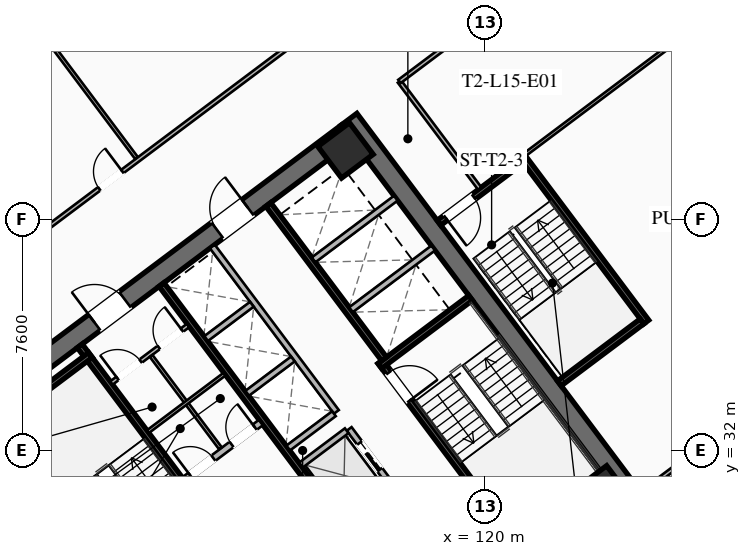
"""IFC4 building model, lengths in metres.
Left out: names, types, materials, properties, quantities, classifications, styles, units other than length and angle.
Written with IfcOpenShell. Run it as: python <this file> out.ifc"""

import sys

from ifc_helpers import new_model, si_unit, direction, frame, frame_2d, origin, origin_2d, place, context, subcontext, project, spatial, rectangle, hollow_rectangle, extrude, element, fill, save


model = new_model("IFC4")
c1 = context("Model", 3, precision=1e-05, world=origin(), true_north=direction((0.0, 1.0)))
c2 = subcontext(c1, "Body", "Model", "MODEL_VIEW")
j1 = project(units=[si_unit("LENGTHUNIT", "METRE"), si_unit("PLANEANGLEUNIT", "RADIAN")], contexts=[c1])
p1 = place(None, origin())
s1 = spatial("IfcSite", under=j1, at=p1, CompositionType="ELEMENT")
p2 = place(p1, origin())
s2 = spatial("IfcBuilding", under=s1, at=p2, CompositionType="ELEMENT")
p3 = place(p2, frame((0.0, 0.0, 60.1)))
s3 = spatial("IfcBuildingStorey", under=s2, at=p3, CompositionType="ELEMENT", Elevation=60.1)
for number, where, z_axis, x_axis in (
    (1, (112.476, 21.107, 0.0), (0.0, 0.0, 1.0), (-0.6, 0.8, 0.0)),
    (2, (115.524, 42.893, 0.0), (0.0, 0.0, 1.0), (0.6, -0.8, 0.0)),
):
    element("IfcWall", number, at=place(p3, frame(where, z_axis=z_axis, x_axis=x_axis)), inside=s3, PredefinedType="SHEAR", context=c2, shape_type="SweptSolid", body=[
        extrude(rectangle(XDim=15.6, YDim=0.65, at=frame_2d((7.8, 0.0))), origin(), (0.0, 0.0, 1.0), 3.55),
    ])
p4 = place(p3, frame((103.571, 33.522, 0.0), z_axis=(0.0, 0.0, 1.0), x_axis=(0.799998028465, 0.600002628705, 0.0)))
e3 = element("IfcWall", 3, at=p4, inside=s3, PredefinedType="SHEAR", context=c2, shape_type="SweptSolid", body=[
    extrude(rectangle(XDim=14.86, YDim=0.65, at=frame_2d((7.43, 0.0))), origin(), (0.0, 0.0, 1.0), 3.55),
])
p5 = place(p4, frame((4.48, 0.0, 0.0)))
e4 = element("IfcOpeningElement", 4, at=p5, cuts=e3, PredefinedType="OPENING", context=c2, shape_type="SweptSolid", body=[
    extrude(rectangle(XDim=1.25, YDim=2.25, at=frame_2d((0.625, 1.125))), frame((0.0, 0.335, 0.0), z_axis=(0.0, -1.0, 0.0), x_axis=(1.0, 0.0, 0.0)), (0.0, 0.0, 1.0), 0.67),
])
p6 = place(p4, frame((9.53, 0.0, 0.0)))
e5 = element("IfcOpeningElement", 5, at=p6, cuts=e3, PredefinedType="OPENING", context=c2, shape_type="SweptSolid", body=[
    extrude(rectangle(XDim=1.25, YDim=2.25, at=frame_2d((0.625, 1.125))), frame((0.0, 0.335, 0.0), z_axis=(0.0, -1.0, 0.0), x_axis=(1.0, 0.0, 0.0)), (0.0, 0.0, 1.0), 0.67),
])
for number, where, z_axis, x_axis in (
    (6, (123.87, 30.59, 0.0), (0.0, 0.0, 1.0), (0.8, 0.6, 0.0)),
    (7, (115.41, 41.87, 0.0), (0.0, 0.0, 1.0), (0.8, 0.6, 0.0)),
):
    element("IfcColumn", number, at=place(p3, frame(where, z_axis=z_axis, x_axis=x_axis)), inside=s3, PredefinedType="COLUMN", context=c2, shape_type="SweptSolid", body=[
        extrude(hollow_rectangle(XDim=1.3, YDim=1.3, WallThickness=0.05, at=origin_2d()), origin(), (0.0, 0.0, 1.0), 3.35),
    ])
p7 = place(p3, frame((111.44, 29.08, 0.0), z_axis=(0.0, 0.0, 1.0), x_axis=(-0.600009827119, 0.799992629566, 0.0)))
e8 = element("IfcWall", 8, at=p7, inside=s3, PredefinedType="SHEAR", context=c2, shape_type="SweptSolid", body=[
    extrude(rectangle(XDim=7.95, YDim=0.2, at=frame_2d((3.975, 0.0))), origin(), (0.0, 0.0, 1.0), 3.35),
])
p8 = place(p7, frame((0.45, 0.0, 0.0)))
e9 = element("IfcOpeningElement", 9, at=p8, cuts=e8, PredefinedType="OPENING", context=c2, shape_type="SweptSolid", body=[
    extrude(rectangle(XDim=1.15, YDim=2.2, at=frame_2d((0.575, 1.1))), frame((0.0, 0.11, 0.0), z_axis=(0.0, -1.0, 0.0), x_axis=(1.0, 0.0, 0.0)), (0.0, 0.0, 1.0), 0.22),
])
p9 = place(p3, frame((104.036, 32.902, 0.0), z_axis=(0.0, 0.0, 1.0), x_axis=(0.800039270442, 0.59994763584, 0.0)))
e10 = element("IfcWall", 10, at=p9, inside=s3, PredefinedType="SHEAR", context=c2, shape_type="SweptSolid", body=[
    extrude(rectangle(XDim=3.73, YDim=0.2, at=frame_2d((1.865, 0.0))), origin(), (0.0, 0.0, 1.0), 3.35),
])
p10 = place(p3, frame((116.56, 34.92, 0.0), z_axis=(0.0, 0.0, 1.0), x_axis=(0.600009827119, -0.799992629566, 0.0)))
e11 = element("IfcWall", 11, at=p10, inside=s3, PredefinedType="SHEAR", context=c2, shape_type="SweptSolid", body=[
    extrude(rectangle(XDim=7.95, YDim=0.2, at=frame_2d((3.975, 0.0))), origin(), (0.0, 0.0, 1.0), 3.35),
])
p11 = place(p10, frame((0.45, 0.0, 0.0)))
e12 = element("IfcOpeningElement", 12, at=p11, cuts=e11, PredefinedType="OPENING", context=c2, shape_type="SweptSolid", body=[
    extrude(rectangle(XDim=1.15, YDim=2.2, at=frame_2d((0.575, 1.1))), frame((0.0, 0.11, 0.0), z_axis=(0.0, -1.0, 0.0), x_axis=(1.0, 0.0, 0.0)), (0.0, 0.0, 1.0), 0.22),
])
for number, where, z_axis, x_axis in (
    (13, (116.54, 34.78, 0.0), (0.0, 0.0, 1.0), (0.8, 0.6, 0.0)),
    (14, (120.98, 28.86, 0.0), (0.0, 0.0, 1.0), (0.8, 0.6, 0.0)),
):
    element("IfcWall", number, at=place(p3, frame(where, z_axis=z_axis, x_axis=x_axis)), inside=s3, PredefinedType="SHEAR", context=c2, shape_type="SweptSolid", body=[
        extrude(rectangle(XDim=3.73, YDim=0.2, at=frame_2d((1.865, 0.0))), origin(), (0.0, 0.0, 1.0), 3.35),
    ])
p12 = place(p3, frame((117.938, 26.016, 0.0), z_axis=(0.0, 0.0, 1.0), x_axis=(-0.600005463273, 0.799995902516, 0.0)))
e15 = element("IfcWall", 15, at=p12, inside=s3, PredefinedType="SHEAR", context=c2, shape_type="SweptSolid", body=[
    extrude(rectangle(XDim=14.3, YDim=0.2, at=frame_2d((7.15, 0.0))), origin(), (0.0, 0.0, 1.0), 3.35),
])
p13 = place(p3, frame((110.104, 31.028, 0.0), z_axis=(0.0, 0.0, 1.0), x_axis=(0.800018601094, 0.59997519774, 0.0)))
e16 = element("IfcWall", 16, at=p13, inside=s3, PredefinedType="SOLIDWALL", context=c2, shape_type="SweptSolid", body=[
    extrude(rectangle(XDim=3.15, YDim=0.22, at=frame_2d((1.575, 0.0))), origin(), (0.0, 0.0, 1.0), 2.703),
])
p14 = place(p13, frame((0.25, 0.0, 0.0)))
e17 = element("IfcOpeningElement", 17, at=p14, cuts=e16, PredefinedType="OPENING", context=c2, shape_type="SweptSolid", body=[
    extrude(rectangle(XDim=0.95, YDim=2.05, at=frame_2d((0.475, 1.025))), frame((0.0, 0.12, 0.0), z_axis=(0.0, -1.0, 0.0), x_axis=(1.0, 0.0, 0.0)), (0.0, 0.0, 1.0), 0.24),
])
p15 = place(p13, frame((1.95, 0.0, 0.0)))
e18 = element("IfcOpeningElement", 18, at=p15, cuts=e16, PredefinedType="OPENING", context=c2, shape_type="SweptSolid", body=[
    extrude(rectangle(XDim=0.95, YDim=2.05, at=frame_2d((0.475, 1.025))), frame((0.0, 0.12, 0.0), z_axis=(0.0, -1.0, 0.0), x_axis=(1.0, 0.0, 0.0)), (0.0, 0.0, 1.0), 0.24),
])
p16 = place(p3, frame((112.87, 40.09, 0.0), z_axis=(0.0, 0.0, 1.0), x_axis=(0.599975393228, -0.800018454488, 0.0)))
e19 = element("IfcWall", 19, at=p16, inside=s3, PredefinedType="SHEAR", context=c2, shape_type="SweptSolid", body=[
    extrude(rectangle(XDim=6.35, YDim=0.2, at=frame_2d((3.175, 0.0))), origin(), (0.0, 0.0, 1.0), 3.35),
])
for number, where, z_axis, x_axis in (
    (20, (115.59, 36.63, 0.0), (0.0, 0.0, 1.0), (0.8, 0.6, 0.0)),
    (21, (114.36, 38.27, 0.0), (0.0, 0.0, 1.0), (0.8, 0.6, 0.0)),
):
    element("IfcWall", number, at=place(p3, frame(where, z_axis=z_axis, x_axis=x_axis)), inside=s3, PredefinedType="SOLIDWALL", context=c2, shape_type="SweptSolid", body=[
        extrude(rectangle(XDim=3.38, YDim=0.2, at=frame_2d((1.69, 0.0))), origin(), (0.0, 0.0, 1.0), 3.35),
    ])
p17 = place(p3, frame((107.71, 34.22, 0.0), z_axis=(0.0, 0.0, 1.0), x_axis=(0.799981399002, 0.60002480053, 0.0)))
e22 = element("IfcWall", 22, at=p17, inside=s3, PredefinedType="PARTITIONING", context=c2, shape_type="SweptSolid", body=[
    extrude(rectangle(XDim=3.15, YDim=0.135, at=frame_2d((1.575, 0.0))), origin(), (0.0, 0.0, 1.0), 2.703),
])
p18 = place(p17, frame((0.25, 0.0, 0.0)))
e23 = element("IfcOpeningElement", 23, at=p18, cuts=e22, PredefinedType="OPENING", context=c2, shape_type="SweptSolid", body=[
    extrude(rectangle(XDim=0.95, YDim=2.05, at=frame_2d((0.475, 1.025))), frame((0.0, 0.077, 0.0), z_axis=(0.0, -1.0, 0.0), x_axis=(1.0, 0.0, 0.0)), (0.0, 0.0, 1.0), 0.155),
])
p19 = place(p17, frame((1.95, 0.0, 0.0)))
e24 = element("IfcOpeningElement", 24, at=p19, cuts=e22, PredefinedType="OPENING", context=c2, shape_type="SweptSolid", body=[
    extrude(rectangle(XDim=0.95, YDim=2.05, at=frame_2d((0.475, 1.025))), frame((0.0, 0.077, 0.0), z_axis=(0.0, -1.0, 0.0), x_axis=(1.0, 0.0, 0.0)), (0.0, 0.0, 1.0), 0.155),
])
p20 = place(p3, frame((111.296, 32.072, 0.0), z_axis=(0.0, 0.0, 1.0), x_axis=(-0.59995887973, 0.800030838552, 0.0)))
e25 = element("IfcWall", 25, at=p20, inside=s3, PredefinedType="PARTITIONING", context=c2, shape_type="SweptSolid", body=[
    extrude(rectangle(XDim=3.8, YDim=0.11, at=frame_2d((1.9, 0.0))), origin(), (0.0, 0.0, 1.0), 2.703),
])
p21 = place(p3, frame((108.91, 32.62, 0.0), z_axis=(0.0, 0.0, 1.0), x_axis=(0.800018601094, 0.59997519774, 0.0)))
e26 = element("IfcWall", 26, at=p21, inside=s3, PredefinedType="PARTITIONING", context=c2, shape_type="SweptSolid", body=[
    extrude(rectangle(XDim=3.15, YDim=0.11, at=frame_2d((1.575, 0.0))), origin(), (0.0, 0.0, 1.0), 2.703),
])
p22 = place(p3, frame((119.61, 27.27, 0.0), z_axis=(0.0, 0.0, 1.0), x_axis=(-0.600011488909, 0.79999138319, 0.0)))
e27 = element("IfcWall", 27, at=p22, inside=s3, PredefinedType="SOLIDWALL", context=c2, shape_type="SweptSolid", body=[
    extrude(rectangle(XDim=6.8, YDim=0.2, at=frame_2d((3.4, 0.0))), origin(), (0.0, 0.0, 1.0), 3.35),
])
p23 = place(p22, frame((0.625, 0.0, 0.0)))
e28 = element("IfcOpeningElement", 28, at=p23, cuts=e27, PredefinedType="OPENING", context=c2, shape_type="SweptSolid", body=[
    extrude(rectangle(XDim=1.1, YDim=2.2, at=frame_2d((0.55, 1.1))), frame((0.0, 0.11, 0.0), z_axis=(0.0, -1.0, 0.0), x_axis=(1.0, 0.0, 0.0)), (0.0, 0.0, 1.0), 0.22),
])
p24 = place(p22, frame((2.875, 0.0, 0.0)))
e29 = element("IfcOpeningElement", 29, at=p24, cuts=e27, PredefinedType="OPENING", context=c2, shape_type="SweptSolid", body=[
    extrude(rectangle(XDim=1.1, YDim=2.2, at=frame_2d((0.55, 1.1))), frame((0.0, 0.11, 0.0), z_axis=(0.0, -1.0, 0.0), x_axis=(1.0, 0.0, 0.0)), (0.0, 0.0, 1.0), 0.22),
])
p25 = place(p22, frame((5.125, 0.0, 0.0)))
e30 = element("IfcOpeningElement", 30, at=p25, cuts=e27, PredefinedType="OPENING", context=c2, shape_type="SweptSolid", body=[
    extrude(rectangle(XDim=1.1, YDim=2.2, at=frame_2d((0.55, 1.1))), frame((0.0, 0.11, 0.0), z_axis=(0.0, -1.0, 0.0), x_axis=(1.0, 0.0, 0.0)), (0.0, 0.0, 1.0), 0.22),
])
p26 = place(p3, frame((113.946, 31.522, 0.0), z_axis=(0.0, 0.0, 1.0), x_axis=(0.8, 0.6, 0.0)))
e31 = element("IfcWall", 31, at=p26, inside=s3, PredefinedType="SOLIDWALL", context=c2, shape_type="SweptSolid", body=[
    extrude(rectangle(XDim=1.88, YDim=0.2, at=frame_2d((0.94, 0.0))), origin(), (0.0, 0.0, 1.0), 3.35),
])
p27 = place(p3, frame((115.11, 33.27, 0.0), z_axis=(0.0, 0.0, 1.0), x_axis=(-0.600011488909, 0.79999138319, 0.0)))
e32 = element("IfcWall", 32, at=p27, inside=s3, PredefinedType="SOLIDWALL", context=c2, shape_type="SweptSolid", body=[
    extrude(rectangle(XDim=6.8, YDim=0.2, at=frame_2d((3.4, 0.0))), origin(), (0.0, 0.0, 1.0), 3.35),
])
p28 = place(p3, frame((113.526, 32.082, 0.0), z_axis=(0.0, 0.0, 1.0), x_axis=(0.800046745961, 0.599937666993, 0.0)))
e33 = element("IfcWall", 33, at=p28, inside=s3, PredefinedType="SOLIDWALL", context=c2, shape_type="SweptSolid", body=[
    extrude(rectangle(XDim=1.88, YDim=0.2, at=frame_2d((0.94, 0.0))), origin(), (0.0, 0.0, 1.0), 3.35),
])
p29 = place(p3, frame((112.176, 33.882, 0.0), z_axis=(0.0, 0.0, 1.0), x_axis=(0.8, 0.6, 0.0)))
e34 = element("IfcWall", 34, at=p29, inside=s3, PredefinedType="SOLIDWALL", context=c2, shape_type="SweptSolid", body=[
    extrude(rectangle(XDim=1.88, YDim=0.2, at=frame_2d((0.94, 0.0))), origin(), (0.0, 0.0, 1.0), 3.35),
])
p30 = place(p3, frame((110.826, 35.682, 0.0), z_axis=(0.0, 0.0, 1.0), x_axis=(0.799984418148, 0.600020775241, 0.0)))
e35 = element("IfcWall", 35, at=p30, inside=s3, PredefinedType="SOLIDWALL", context=c2, shape_type="SweptSolid", body=[
    extrude(rectangle(XDim=1.88, YDim=0.2, at=frame_2d((0.94, 0.0))), origin(), (0.0, 0.0, 1.0), 3.35),
])
p31 = place(p3, frame((125.304, 36.228, 0.0), z_axis=(0.0, 0.0, 1.0), x_axis=(-0.59998851072, 0.800008616831, 0.0)))
e36 = element("IfcWall", 36, at=p31, inside=s3, PredefinedType="SHEAR", context=c2, shape_type="SweptSolid", body=[
    extrude(rectangle(XDim=6.8, YDim=0.2, at=frame_2d((3.4, 0.0))), origin(), (0.0, 0.0, 1.0), 3.35),
])
p32 = place(p3, frame((121.204, 41.528, 0.0), z_axis=(0.0, 0.0, 1.0), x_axis=(-0.800017232136, -0.599977023131, 0.0)))
e37 = element("IfcWall", 37, at=p32, inside=s3, PredefinedType="SHEAR", context=c2, shape_type="SweptSolid", body=[
    extrude(rectangle(XDim=3.4, YDim=0.2, at=frame_2d((1.7, 0.0))), origin(), (0.0, 0.0, 1.0), 3.35),
])
p33 = place(p32, frame((1.975, 0.0, 0.0)))
e38 = element("IfcOpeningElement", 38, at=p33, cuts=e37, PredefinedType="OPENING", context=c2, shape_type="SweptSolid", body=[
    extrude(rectangle(XDim=1.15, YDim=2.2, at=frame_2d((0.575, 1.1))), frame((0.0, 0.11, 0.0), z_axis=(0.0, -1.0, 0.0), x_axis=(1.0, 0.0, 0.0)), (0.0, 0.0, 1.0), 0.22),
])
p34 = place(p3, frame((122.444, 34.208, 0.0), z_axis=(0.0, 0.0, 1.0), x_axis=(0.79999138319, 0.600011488909, 0.0)))
e39 = element("IfcWall", 39, at=p34, inside=s3, PredefinedType="SHEAR", context=c2, shape_type="SweptSolid", body=[
    extrude(rectangle(XDim=3.4, YDim=0.2, at=frame_2d((1.7, 0.0))), origin(), (0.0, 0.0, 1.0), 3.35),
])
p35 = place(p3, frame((119.824, 40.618, 0.0), z_axis=(0.0, 0.0, 1.0), x_axis=(-0.599982243973, 0.800013316712, 0.0)))
e40 = element("IfcWall", 40, at=p35, inside=s3, PredefinedType="PARTITIONING", context=c2, shape_type="SweptSolid", body=[
    extrude(rectangle(XDim=4.4, YDim=0.135, at=frame_2d((2.2, 0.0))), origin(), (0.0, 0.0, 1.0), 2.703),
])
p36 = place(p3, frame((98.396, 33.922, 0.0), z_axis=(0.0, 0.0, 1.0), x_axis=(0.800001954438, 0.599997394074, 0.0)))
e41 = element("IfcWall", 41, at=p36, inside=s3, PredefinedType="PARTITIONING", context=c2, shape_type="SweptSolid", body=[
    extrude(rectangle(XDim=29.98, YDim=0.135, at=frame_2d((14.99, 0.0))), origin(), (0.0, 0.0, 1.0), 2.703),
])
p37 = place(p36, frame((0.3, 0.0, 0.0)))
e42 = element("IfcOpeningElement", 42, at=p37, cuts=e41, PredefinedType="OPENING", context=c2, shape_type="SweptSolid", body=[
    extrude(rectangle(XDim=0.95, YDim=2.05, at=frame_2d((0.475, 1.025))), frame((0.0, 0.077, 0.0), z_axis=(0.0, -1.0, 0.0), x_axis=(1.0, 0.0, 0.0)), (0.0, 0.0, 1.0), 0.155),
])
p38 = place(p36, frame((11.143, 0.0, 0.0)))
e43 = element("IfcOpeningElement", 43, at=p38, cuts=e41, PredefinedType="OPENING", context=c2, shape_type="SweptSolid", body=[
    extrude(rectangle(XDim=0.95, YDim=2.05, at=frame_2d((0.475, 1.025))), frame((0.0, 0.077, 0.0), z_axis=(0.0, -1.0, 0.0), x_axis=(1.0, 0.0, 0.0)), (0.0, 0.0, 1.0), 0.155),
])
p39 = place(p36, frame((28.73, 0.0, 0.0)))
e44 = element("IfcOpeningElement", 44, at=p39, cuts=e41, PredefinedType="OPENING", context=c2, shape_type="SweptSolid", body=[
    extrude(rectangle(XDim=0.95, YDim=2.05, at=frame_2d((0.475, 1.025))), frame((0.0, 0.077, 0.0), z_axis=(0.0, -1.0, 0.0), x_axis=(1.0, 0.0, 0.0)), (0.0, 0.0, 1.0), 0.155),
])
p40 = place(p3, frame((108.532, 41.624, 0.0), z_axis=(0.0, 0.0, 1.0), x_axis=(-0.599992698573, 0.800005476018, 0.0)))
e45 = element("IfcWall", 45, at=p40, inside=s3, PredefinedType="PARTITIONING", context=c2, shape_type="SweptSolid", body=[
    extrude(rectangle(XDim=10.7, YDim=0.11, at=frame_2d((5.35, 0.0))), origin(), (0.0, 0.0, 1.0), 2.703),
])
p41 = place(p3, frame((135.46, 34.47, 0.0), z_axis=(0.0, 0.0, 1.0), x_axis=(-0.799998045563, -0.600002605907, 0.0)))
e46 = element("IfcWall", 46, at=p41, inside=s3, PredefinedType="PARTITIONING", context=c2, shape_type="SweptSolid", body=[
    extrude(rectangle(XDim=29.98, YDim=0.135, at=frame_2d((14.99, 0.0))), origin(), (0.0, 0.0, 1.0), 2.703),
])
p42 = place(p41, frame((28.65, 0.0, 0.0)))
e47 = element("IfcOpeningElement", 47, at=p42, cuts=e46, PredefinedType="OPENING", context=c2, shape_type="SweptSolid", body=[
    extrude(rectangle(XDim=0.95, YDim=2.05, at=frame_2d((0.475, 1.025))), frame((0.0, 0.077, 0.0), z_axis=(0.0, -1.0, 0.0), x_axis=(1.0, 0.0, 0.0)), (0.0, 0.0, 1.0), 0.155),
])
p43 = place(p41, frame((17.938, 0.0, 0.0)))
e48 = element("IfcOpeningElement", 48, at=p43, cuts=e46, PredefinedType="OPENING", context=c2, shape_type="SweptSolid", body=[
    extrude(rectangle(XDim=0.95, YDim=2.05, at=frame_2d((0.475, 1.025))), frame((0.0, 0.077, 0.0), z_axis=(0.0, -1.0, 0.0), x_axis=(1.0, 0.0, 0.0)), (0.0, 0.0, 1.0), 0.155),
])
p44 = place(p41, frame((0.38, 0.0, 0.0)))
e49 = element("IfcOpeningElement", 49, at=p44, cuts=e46, PredefinedType="OPENING", context=c2, shape_type="SweptSolid", body=[
    extrude(rectangle(XDim=0.95, YDim=2.05, at=frame_2d((0.475, 1.025))), frame((0.0, 0.077, 0.0), z_axis=(0.0, -1.0, 0.0), x_axis=(1.0, 0.0, 0.0)), (0.0, 0.0, 1.0), 0.155),
])
p45 = place(p3, frame((126.664, 51.248, 0.0), z_axis=(0.0, 0.0, 1.0), x_axis=(-0.799995055373, -0.600006592779, 0.0)))
e50 = element("IfcWall", 50, at=p45, inside=s3, PredefinedType="PARTITIONING", context=c2, shape_type="SweptSolid", body=[
    extrude(rectangle(XDim=11.85, YDim=0.135, at=frame_2d((5.925, 0.0))), origin(), (0.0, 0.0, 1.0), 2.703),
])
p46 = place(p45, frame((5.8, 0.0, 0.0)))
e51 = element("IfcOpeningElement", 51, at=p46, cuts=e50, PredefinedType="OPENING", context=c2, shape_type="SweptSolid", body=[
    extrude(rectangle(XDim=0.95, YDim=2.05, at=frame_2d((0.475, 1.025))), frame((0.0, 0.077, 0.0), z_axis=(0.0, -1.0, 0.0), x_axis=(1.0, 0.0, 0.0)), (0.0, 0.0, 1.0), 0.155),
])
p47 = place(p3, frame((125.208, 30.656, 0.0), z_axis=(0.0, 0.0, 1.0), x_axis=(0.799995666112, 0.600005778473, 0.0)))
e52 = element("IfcWall", 52, at=p47, inside=s3, PredefinedType="PARTITIONING", context=c2, shape_type="SweptSolid", body=[
    extrude(rectangle(XDim=13.52, YDim=0.135, at=frame_2d((6.76, 0.0))), origin(), (0.0, 0.0, 1.0), 2.703),
])
p48 = place(p47, frame((2.045, 0.0, 0.0)))
e53 = element("IfcOpeningElement", 53, at=p48, cuts=e52, PredefinedType="OPENING", context=c2, shape_type="SweptSolid", body=[
    extrude(rectangle(XDim=0.95, YDim=2.05, at=frame_2d((0.475, 1.025))), frame((0.0, 0.077, 0.0), z_axis=(0.0, -1.0, 0.0), x_axis=(1.0, 0.0, 0.0)), (0.0, 0.0, 1.0), 0.155),
])
p49 = place(p3, frame((129.304, 47.728, 0.0), z_axis=(0.0, 0.0, 1.0), x_axis=(-0.8, -0.6, 0.0)))
e54 = element("IfcWall", 54, at=p49, inside=s3, PredefinedType="PARTITIONING", context=c2, shape_type="SweptSolid", body=[
    extrude(rectangle(XDim=10.0, YDim=0.11, at=frame_2d((5.0, 0.0))), origin(), (0.0, 0.0, 1.0), 2.703),
])
p50 = place(p3, frame((111.428, 16.546, 0.0), z_axis=(0.0, 0.0, 1.0), x_axis=(-0.599996389772, 0.800002707659, 0.0)))
e55 = element("IfcWall", 55, at=p50, inside=s3, PredefinedType="PARTITIONING", context=c2, shape_type="SweptSolid", body=[
    extrude(rectangle(XDim=21.64, YDim=0.135, at=frame_2d((10.82, 0.0))), origin(), (0.0, 0.0, 1.0), 2.703),
])
p51 = place(p50, frame((0.3, 0.0, 0.0)))
e56 = element("IfcOpeningElement", 56, at=p51, cuts=e55, PredefinedType="OPENING", context=c2, shape_type="SweptSolid", body=[
    extrude(rectangle(XDim=0.95, YDim=2.05, at=frame_2d((0.475, 1.025))), frame((0.0, 0.077, 0.0), z_axis=(0.0, -1.0, 0.0), x_axis=(1.0, 0.0, 0.0)), (0.0, 0.0, 1.0), 0.155),
])
p52 = place(p5, origin())
e57 = element("IfcDoor", 57, at=p52, inside=s3, OperationType="SINGLE_SWING_LEFT", PredefinedType="DOOR", context=c2, shape_type="SweptSolid", body=[
    extrude(rectangle(XDim=1.25, YDim=2.25, at=frame_2d((0.625, 1.125))), frame((0.0, 0.025, 0.0), z_axis=(0.0, -1.0, 0.0), x_axis=(1.0, 0.0, 0.0)), (0.0, 0.0, 1.0), 0.05),
])
fill(e4, e57)
p53 = place(p6, origin())
e58 = element("IfcDoor", 58, at=p53, inside=s3, OperationType="SINGLE_SWING_RIGHT", PredefinedType="DOOR", context=c2, shape_type="SweptSolid", body=[
    extrude(rectangle(XDim=1.25, YDim=2.25, at=frame_2d((0.625, 1.125))), frame((0.0, 0.025, 0.0), z_axis=(0.0, -1.0, 0.0), x_axis=(1.0, 0.0, 0.0)), (0.0, 0.0, 1.0), 0.05),
])
fill(e5, e58)
p54 = place(p11, origin())
e59 = element("IfcDoor", 59, at=p54, inside=s3, OperationType="SINGLE_SWING_RIGHT", PredefinedType="DOOR", context=c2, shape_type="SweptSolid", body=[
    extrude(rectangle(XDim=1.15, YDim=2.2, at=frame_2d((0.575, 1.1))), frame((0.0, 0.025, 0.0), z_axis=(0.0, -1.0, 0.0), x_axis=(1.0, 0.0, 0.0)), (0.0, 0.0, 1.0), 0.05),
])
fill(e12, e59)
p55 = place(p18, origin())
e60 = element("IfcDoor", 60, at=p55, inside=s3, OperationType="SINGLE_SWING_LEFT", PredefinedType="DOOR", context=c2, shape_type="SweptSolid", body=[
    extrude(rectangle(XDim=0.95, YDim=2.05, at=frame_2d((0.475, 1.025))), frame((0.0, 0.025, 0.0), z_axis=(0.0, -1.0, 0.0), x_axis=(1.0, 0.0, 0.0)), (0.0, 0.0, 1.0), 0.05),
])
fill(e23, e60)
p56 = place(p19, origin())
e61 = element("IfcDoor", 61, at=p56, inside=s3, OperationType="SINGLE_SWING_RIGHT", PredefinedType="DOOR", context=c2, shape_type="SweptSolid", body=[
    extrude(rectangle(XDim=0.95, YDim=2.05, at=frame_2d((0.475, 1.025))), frame((0.0, 0.025, 0.0), z_axis=(0.0, -1.0, 0.0), x_axis=(1.0, 0.0, 0.0)), (0.0, 0.0, 1.0), 0.05),
])
fill(e24, e61)
p57 = place(p14, origin())
e62 = element("IfcDoor", 62, at=p57, inside=s3, OperationType="SINGLE_SWING_LEFT", PredefinedType="DOOR", context=c2, shape_type="SweptSolid", body=[
    extrude(rectangle(XDim=0.95, YDim=2.05, at=frame_2d((0.475, 1.025))), frame((0.0, 0.025, 0.0), z_axis=(0.0, -1.0, 0.0), x_axis=(1.0, 0.0, 0.0)), (0.0, 0.0, 1.0), 0.05),
])
fill(e17, e62)
p58 = place(p15, origin())
e63 = element("IfcDoor", 63, at=p58, inside=s3, OperationType="SINGLE_SWING_RIGHT", PredefinedType="DOOR", context=c2, shape_type="SweptSolid", body=[
    extrude(rectangle(XDim=0.95, YDim=2.05, at=frame_2d((0.475, 1.025))), frame((0.0, 0.025, 0.0), z_axis=(0.0, -1.0, 0.0), x_axis=(1.0, 0.0, 0.0)), (0.0, 0.0, 1.0), 0.05),
])
fill(e18, e63)
p59 = place(p33, origin())
e64 = element("IfcDoor", 64, at=p59, inside=s3, OperationType="SINGLE_SWING_RIGHT", PredefinedType="DOOR", context=c2, shape_type="SweptSolid", body=[
    extrude(rectangle(XDim=1.15, YDim=2.2, at=frame_2d((0.575, 1.1))), frame((0.0, 0.025, 0.0), z_axis=(0.0, -1.0, 0.0), x_axis=(1.0, 0.0, 0.0)), (0.0, 0.0, 1.0), 0.05),
])
fill(e38, e64)
p60 = place(p38, origin())
e65 = element("IfcDoor", 65, at=p60, inside=s3, OperationType="SINGLE_SWING_RIGHT", PredefinedType="DOOR", context=c2, shape_type="SweptSolid", body=[
    extrude(rectangle(XDim=0.95, YDim=2.05, at=frame_2d((0.475, 1.025))), frame((0.0, 0.025, 0.0), z_axis=(0.0, -1.0, 0.0), x_axis=(1.0, 0.0, 0.0)), (0.0, 0.0, 1.0), 0.05),
])
fill(e43, e65)
p61 = place(p25, origin())
e66 = element("IfcDoor", 66, at=p61, inside=s3, OperationType="SLIDING_TO_LEFT", PredefinedType="DOOR", context=c2, shape_type="SweptSolid", body=[
    extrude(rectangle(XDim=1.1, YDim=2.2, at=frame_2d((0.55, 1.1))), frame((0.0, 0.025, 0.0), z_axis=(0.0, -1.0, 0.0), x_axis=(1.0, 0.0, 0.0)), (0.0, 0.0, 1.0), 0.05),
])
fill(e30, e66)
save(model, sys.argv[1])
